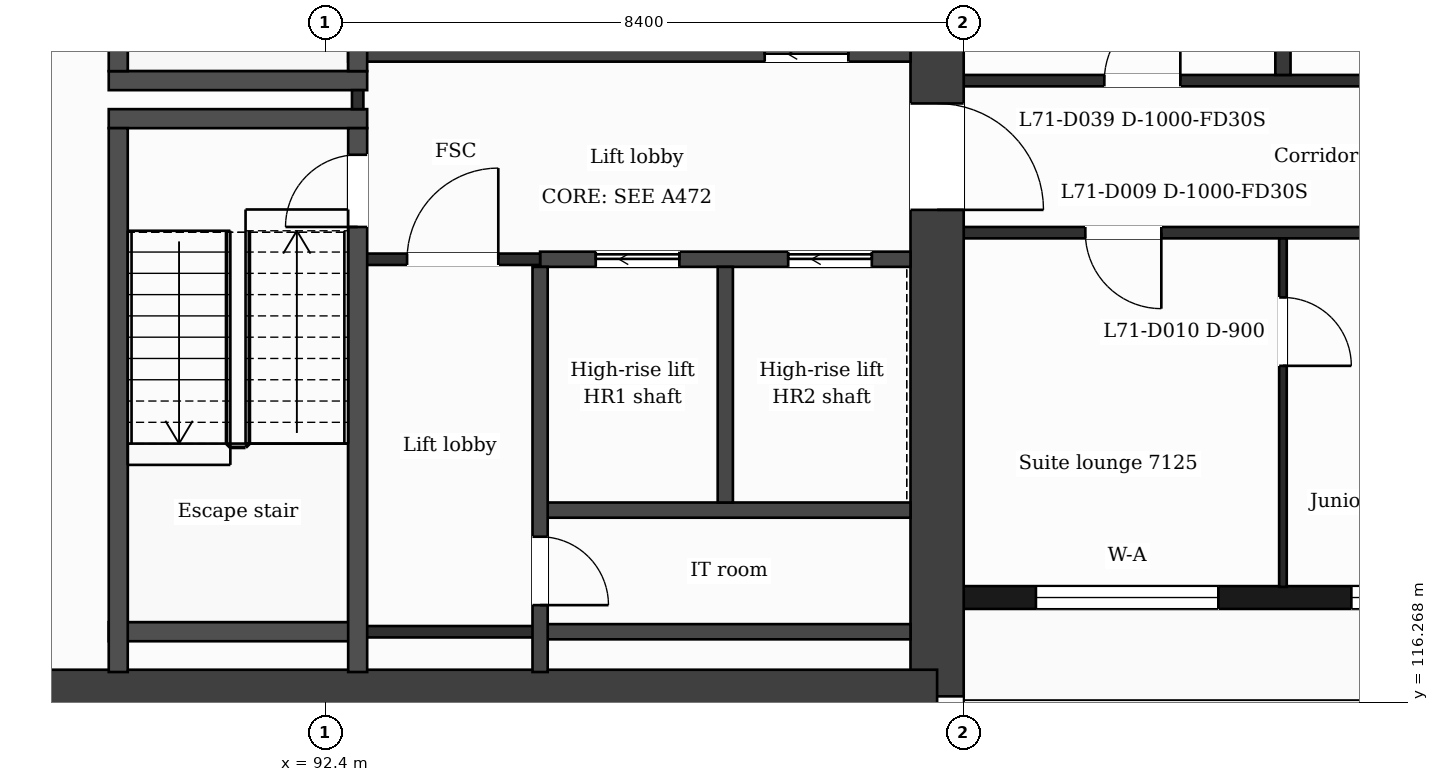
"""IFC4 building model, lengths in metres.
Left out: names, types, materials, properties, quantities, classifications, styles, units other than length and angle.
Written with IfcOpenShell. Run it as: python <this file> out.ifc"""

import sys

from ifc_helpers import new_model, si_unit, direction, frame, frame_2d, origin, place, context, subcontext, project, spatial, rectangle, extrude, element, fill, save


model = new_model("IFC4")
c1 = context("Model", 3, precision=1e-05, world=origin(), true_north=direction((0.0, 1.0)))
c2 = subcontext(c1, "Body", "Model", "MODEL_VIEW")
j1 = project(units=[si_unit("LENGTHUNIT", "METRE"), si_unit("PLANEANGLEUNIT", "RADIAN")], contexts=[c1])
p1 = place(None, origin())
s1 = spatial("IfcSite", under=j1, at=p1, CompositionType="ELEMENT")
p2 = place(p1, origin())
s2 = spatial("IfcBuilding", under=s1, at=p2, CompositionType="ELEMENT")
p3 = place(p2, frame((0.0, 0.0, 292.3)))
s3 = spatial("IfcBuildingStorey", under=s2, at=p3, CompositionType="ELEMENT", Elevation=292.3)
p4 = place(p3, frame((100.45, 132.05, 0.0), z_axis=(0.0, 0.0, 1.0), x_axis=(0.0, -1.0, 0.0)))
e1 = element("IfcWall", 1, at=p4, inside=s3, PredefinedType="SHEAR", context=c2, shape_type="SweptSolid", body=[
    extrude(rectangle(XDim=15.7, YDim=0.7, at=frame_2d((7.85, 0.0))), origin(), (0.0, 0.0, 1.0), 3.7),
])
p5 = place(p4, frame((7.9, 0.0, 0.0)))
e2 = element("IfcOpeningElement", 2, at=p5, cuts=e1, PredefinedType="OPENING", context=c2, shape_type="SweptSolid", body=[
    extrude(rectangle(XDim=1.4, YDim=2.1, at=frame_2d((0.7, 1.05))), frame((0.0, 0.36, 0.0), z_axis=(0.0, -1.0, 0.0), x_axis=(1.0, 0.0, 0.0)), (0.0, 0.0, 1.0), 0.72),
])
p6 = place(p3, frame((100.45, 116.35, 0.0), z_axis=(0.0, 0.0, 1.0), x_axis=(-1.0, 0.0, 0.0)))
e3 = element("IfcWall", 3, at=p6, inside=s3, PredefinedType="SHEAR", context=c2, shape_type="SweptSolid", body=[
    extrude(rectangle(XDim=13.627, YDim=0.7, at=frame_2d((6.813, 0.0))), origin(), (0.0, 0.0, 1.0), 3.7),
])
p7 = place(p3, frame((86.823, 116.35, 0.0), z_axis=(0.0, 0.0, 1.0), x_axis=(0.133416378607, 0.99106007382, 0.0)))
e4 = element("IfcWall", 4, at=p7, inside=s3, PredefinedType="SHEAR", context=c2, shape_type="SweptSolid", body=[
    extrude(rectangle(XDim=15.842, YDim=0.7, at=frame_2d((7.921, 0.0))), origin(), (0.0, 0.0, 1.0), 3.7),
])
p8 = place(p3, frame((100.8, 117.65, 0.0), z_axis=(0.0, 0.0, 1.0), x_axis=(1.0, 0.0, 0.0)))
e5 = element("IfcWall", 5, at=p8, inside=s3, PredefinedType="SOLIDWALL", context=c2, shape_type="SweptSolid", body=[
    extrude(rectangle(XDim=25.2, YDim=0.3, at=frame_2d((12.6, 0.0))), origin(), (0.0, 0.0, 1.0), 3.38),
])
p9 = place(p8, frame((0.95, 0.0, 0.9)))
e6 = element("IfcOpeningElement", 6, at=p9, cuts=e5, PredefinedType="OPENING", context=c2, shape_type="SweptSolid", body=[
    extrude(rectangle(XDim=2.4, YDim=2.1, at=frame_2d((1.2, 1.05))), frame((0.0, 0.16, 0.0), z_axis=(0.0, -1.0, 0.0), x_axis=(1.0, 0.0, 0.0)), (0.0, 0.0, 1.0), 0.32),
])
p10 = place(p8, frame((5.1, 0.0, 0.9)))
e7 = element("IfcOpeningElement", 7, at=p10, cuts=e5, PredefinedType="OPENING", context=c2, shape_type="SweptSolid", body=[
    extrude(rectangle(XDim=2.4, YDim=2.1, at=frame_2d((1.2, 1.05))), frame((0.0, 0.16, 0.0), z_axis=(0.0, -1.0, 0.0), x_axis=(1.0, 0.0, 0.0)), (0.0, 0.0, 1.0), 0.32),
])
p11 = place(p8, frame((9.9, 0.0, 0.0)))
e8 = element("IfcOpeningElement", 8, at=p11, cuts=e5, PredefinedType="OPENING", context=c2, shape_type="SweptSolid", body=[
    extrude(rectangle(XDim=1.2, YDim=2.4, at=frame_2d((0.6, 1.2))), frame((0.0, 0.16, 0.0), z_axis=(0.0, -1.0, 0.0), x_axis=(1.0, 0.0, 0.0)), (0.0, 0.0, 1.0), 0.32),
])
p12 = place(p8, frame((14.1, 0.0, 0.9)))
e9 = element("IfcOpeningElement", 9, at=p12, cuts=e5, PredefinedType="OPENING", context=c2, shape_type="SweptSolid", body=[
    extrude(rectangle(XDim=1.2, YDim=2.1, at=frame_2d((0.6, 1.05))), frame((0.0, 0.16, 0.0), z_axis=(0.0, -1.0, 0.0), x_axis=(1.0, 0.0, 0.0)), (0.0, 0.0, 1.0), 0.32),
])
p13 = place(p8, frame((17.7, 0.0, 0.9)))
e10 = element("IfcOpeningElement", 10, at=p13, cuts=e5, PredefinedType="OPENING", context=c2, shape_type="SweptSolid", body=[
    extrude(rectangle(XDim=2.4, YDim=2.1, at=frame_2d((1.2, 1.05))), frame((0.0, 0.16, 0.0), z_axis=(0.0, -1.0, 0.0), x_axis=(1.0, 0.0, 0.0)), (0.0, 0.0, 1.0), 0.32),
])
p14 = place(p8, frame((21.85, 0.0, 0.9)))
e11 = element("IfcOpeningElement", 11, at=p14, cuts=e5, PredefinedType="OPENING", context=c2, shape_type="SweptSolid", body=[
    extrude(rectangle(XDim=2.4, YDim=2.1, at=frame_2d((1.2, 1.05))), frame((0.0, 0.16, 0.0), z_axis=(0.0, -1.0, 0.0), x_axis=(1.0, 0.0, 0.0)), (0.0, 0.0, 1.0), 0.32),
])
p15 = place(p3, frame((95.227, 117.2, 0.0), z_axis=(0.0, 0.0, 1.0), x_axis=(1.0, 0.0, 0.0)))
e12 = element("IfcWall", 12, at=p15, inside=s3, PredefinedType="PARTITIONING", context=c2, shape_type="SweptSolid", body=[
    extrude(rectangle(XDim=4.873, YDim=0.2, at=frame_2d((2.437, 0.0))), origin(), (0.0, 0.0, 1.0), 3.38),
])
p16 = place(p3, frame((92.827, 117.2, 0.0), z_axis=(0.0, 0.0, 1.0), x_axis=(1.0, 0.0, 0.0)))
e13 = element("IfcWall", 13, at=p16, inside=s3, PredefinedType="PARTITIONING", context=c2, shape_type="SweptSolid", body=[
    extrude(rectangle(XDim=2.4, YDim=0.15, at=frame_2d((1.2, 0.0))), origin(), (0.0, 0.0, 1.0), 3.38),
])
p17 = place(p3, frame((89.552, 117.2, 0.0), z_axis=(0.0, 0.0, 1.0), x_axis=(1.0, 0.0, 0.0)))
e14 = element("IfcWall", 14, at=p17, inside=s3, PredefinedType="PARTITIONING", context=c2, shape_type="SweptSolid", body=[
    extrude(rectangle(XDim=3.275, YDim=0.25, at=frame_2d((1.637, 0.0))), origin(), (0.0, 0.0, 1.0), 3.38),
])
p18 = place(p3, frame((95.227, 118.8, 0.0), z_axis=(0.0, 0.0, 1.0), x_axis=(1.0, 0.0, 0.0)))
e15 = element("IfcWall", 15, at=p18, inside=s3, PredefinedType="PARTITIONING", context=c2, shape_type="SweptSolid", body=[
    extrude(rectangle(XDim=4.873, YDim=0.2, at=frame_2d((2.437, 0.0))), origin(), (0.0, 0.0, 1.0), 3.38),
])
p19 = place(p3, frame((95.227, 122.1, 0.0), z_axis=(0.0, 0.0, 1.0), x_axis=(1.0, 0.0, 0.0)))
e16 = element("IfcWall", 16, at=p19, inside=s3, PredefinedType="PARTITIONING", context=c2, shape_type="SweptSolid", body=[
    extrude(rectangle(XDim=4.873, YDim=0.2, at=frame_2d((2.437, 0.0))), origin(), (0.0, 0.0, 1.0), 3.38),
])
p20 = place(p19, frame((0.732, 0.0, 0.0)))
e17 = element("IfcOpeningElement", 17, at=p20, cuts=e16, PredefinedType="OPENING", context=c2, shape_type="SweptSolid", body=[
    extrude(rectangle(XDim=1.1, YDim=2.1, at=frame_2d((0.55, 1.05))), frame((0.0, 0.11, 0.0), z_axis=(0.0, -1.0, 0.0), x_axis=(1.0, 0.0, 0.0)), (0.0, 0.0, 1.0), 0.22),
])
p21 = place(p19, frame((3.264, 0.0, 0.0)))
e18 = element("IfcOpeningElement", 18, at=p21, cuts=e16, PredefinedType="OPENING", context=c2, shape_type="SweptSolid", body=[
    extrude(rectangle(XDim=1.1, YDim=2.1, at=frame_2d((0.55, 1.05))), frame((0.0, 0.11, 0.0), z_axis=(0.0, -1.0, 0.0), x_axis=(1.0, 0.0, 0.0)), (0.0, 0.0, 1.0), 0.22),
])
p22 = place(p3, frame((92.827, 122.1, 0.0), z_axis=(0.0, 0.0, 1.0), x_axis=(1.0, 0.0, 0.0)))
e19 = element("IfcWall", 19, at=p22, inside=s3, PredefinedType="PARTITIONING", context=c2, shape_type="SweptSolid", body=[
    extrude(rectangle(XDim=2.4, YDim=0.15, at=frame_2d((1.2, 0.0))), origin(), (0.0, 0.0, 1.0), 3.38),
])
p23 = place(p22, frame((0.65, 0.0, 0.0)))
e20 = element("IfcOpeningElement", 20, at=p23, cuts=e19, PredefinedType="OPENING", context=c2, shape_type="SweptSolid", body=[
    extrude(rectangle(XDim=1.2, YDim=2.1, at=frame_2d((0.6, 1.05))), frame((0.0, 0.085, 0.0), z_axis=(0.0, -1.0, 0.0), x_axis=(1.0, 0.0, 0.0)), (0.0, 0.0, 1.0), 0.17),
])
p24 = place(p3, frame((100.8, 122.45, 0.0), z_axis=(0.0, 0.0, 1.0), x_axis=(1.0, 0.0, 0.0)))
e21 = element("IfcWall", 21, at=p24, inside=s3, PredefinedType="PARTITIONING", context=c2, shape_type="SweptSolid", body=[
    extrude(rectangle(XDim=25.2, YDim=0.15, at=frame_2d((12.6, 0.0))), origin(), (0.0, 0.0, 1.0), 3.38),
])
p25 = place(p24, frame((1.6, 0.0, 0.0)))
e22 = element("IfcOpeningElement", 22, at=p25, cuts=e21, PredefinedType="OPENING", context=c2, shape_type="SweptSolid", body=[
    extrude(rectangle(XDim=1.0, YDim=2.1, at=frame_2d((0.5, 1.05))), frame((0.0, 0.085, 0.0), z_axis=(0.0, -1.0, 0.0), x_axis=(1.0, 0.0, 0.0)), (0.0, 0.0, 1.0), 0.17),
])
p26 = place(p24, frame((11.12, 0.0, 0.0)))
e23 = element("IfcOpeningElement", 23, at=p26, cuts=e21, PredefinedType="OPENING", context=c2, shape_type="SweptSolid", body=[
    extrude(rectangle(XDim=0.95, YDim=2.1, at=frame_2d((0.475, 1.05))), frame((0.0, 0.085, 0.0), z_axis=(0.0, -1.0, 0.0), x_axis=(1.0, 0.0, 0.0)), (0.0, 0.0, 1.0), 0.17),
])
p27 = place(p24, frame((13.05, 0.0, 0.0)))
e24 = element("IfcOpeningElement", 24, at=p27, cuts=e21, PredefinedType="OPENING", context=c2, shape_type="SweptSolid", body=[
    extrude(rectangle(XDim=1.0, YDim=2.1, at=frame_2d((0.5, 1.05))), frame((0.0, 0.085, 0.0), z_axis=(0.0, -1.0, 0.0), x_axis=(1.0, 0.0, 0.0)), (0.0, 0.0, 1.0), 0.17),
])
p28 = place(p24, frame((19.61, 0.0, 0.0)))
e25 = element("IfcOpeningElement", 25, at=p28, cuts=e21, PredefinedType="OPENING", context=c2, shape_type="SweptSolid", body=[
    extrude(rectangle(XDim=0.95, YDim=2.1, at=frame_2d((0.475, 1.05))), frame((0.0, 0.085, 0.0), z_axis=(0.0, -1.0, 0.0), x_axis=(1.0, 0.0, 0.0)), (0.0, 0.0, 1.0), 0.17),
])
p29 = place(p24, frame((21.275, 0.0, 0.0)))
e26 = element("IfcOpeningElement", 26, at=p29, cuts=e21, PredefinedType="OPENING", context=c2, shape_type="SweptSolid", body=[
    extrude(rectangle(XDim=0.95, YDim=2.1, at=frame_2d((0.475, 1.05))), frame((0.0, 0.085, 0.0), z_axis=(0.0, -1.0, 0.0), x_axis=(1.0, 0.0, 0.0)), (0.0, 0.0, 1.0), 0.17),
])
for number, where, z_axis, x_axis in (
    (27, (89.552, 123.95, 0.0), (0.0, 0.0, 1.0), (1.0, 0.0, 0.0)),
    (28, (89.552, 124.45, 0.0), (0.0, 0.0, 1.0), (1.0, 0.0, 0.0)),
):
    element("IfcWall", number, at=place(p3, frame(where, z_axis=z_axis, x_axis=x_axis)), inside=s3, PredefinedType="PARTITIONING", context=c2, shape_type="SweptSolid", body=[
        extrude(rectangle(XDim=3.4, YDim=0.25, at=frame_2d((1.7, 0.0))), origin(), (0.0, 0.0, 1.0), 3.38),
    ])
p30 = place(p3, frame((100.8, 124.45, 0.0), z_axis=(0.0, 0.0, 1.0), x_axis=(1.0, 0.0, 0.0)))
e29 = element("IfcWall", 29, at=p30, inside=s3, PredefinedType="PARTITIONING", context=c2, shape_type="SweptSolid", body=[
    extrude(rectangle(XDim=25.2, YDim=0.15, at=frame_2d((12.6, 0.0))), origin(), (0.0, 0.0, 1.0), 3.38),
])
p31 = place(p30, frame((1.85, 0.0, 0.0)))
e30 = element("IfcOpeningElement", 30, at=p31, cuts=e29, PredefinedType="OPENING", context=c2, shape_type="SweptSolid", body=[
    extrude(rectangle(XDim=1.0, YDim=2.1, at=frame_2d((0.5, 1.05))), frame((0.0, 0.085, 0.0), z_axis=(0.0, -1.0, 0.0), x_axis=(1.0, 0.0, 0.0)), (0.0, 0.0, 1.0), 0.17),
])
p32 = place(p30, frame((6.425, 0.0, 0.0)))
e31 = element("IfcOpeningElement", 31, at=p32, cuts=e29, PredefinedType="OPENING", context=c2, shape_type="SweptSolid", body=[
    extrude(rectangle(XDim=1.0, YDim=2.1, at=frame_2d((0.5, 1.05))), frame((0.0, 0.085, 0.0), z_axis=(0.0, -1.0, 0.0), x_axis=(1.0, 0.0, 0.0)), (0.0, 0.0, 1.0), 0.17),
])
p33 = place(p30, frame((9.4, 0.0, 0.0)))
e32 = element("IfcOpeningElement", 32, at=p33, cuts=e29, PredefinedType="OPENING", context=c2, shape_type="SweptSolid", body=[
    extrude(rectangle(XDim=1.0, YDim=2.1, at=frame_2d((0.5, 1.05))), frame((0.0, 0.085, 0.0), z_axis=(0.0, -1.0, 0.0), x_axis=(1.0, 0.0, 0.0)), (0.0, 0.0, 1.0), 0.17),
])
p34 = place(p30, frame((14.825, 0.0, 0.0)))
e33 = element("IfcOpeningElement", 33, at=p34, cuts=e29, PredefinedType="OPENING", context=c2, shape_type="SweptSolid", body=[
    extrude(rectangle(XDim=1.0, YDim=2.1, at=frame_2d((0.5, 1.05))), frame((0.0, 0.085, 0.0), z_axis=(0.0, -1.0, 0.0), x_axis=(1.0, 0.0, 0.0)), (0.0, 0.0, 1.0), 0.17),
])
p35 = place(p30, frame((18.825, 0.0, 0.0)))
e34 = element("IfcOpeningElement", 34, at=p35, cuts=e29, PredefinedType="OPENING", context=c2, shape_type="SweptSolid", body=[
    extrude(rectangle(XDim=1.0, YDim=2.1, at=frame_2d((0.5, 1.05))), frame((0.0, 0.085, 0.0), z_axis=(0.0, -1.0, 0.0), x_axis=(1.0, 0.0, 0.0)), (0.0, 0.0, 1.0), 0.17),
])
p36 = place(p3, frame((92.702, 124.8, 0.0), z_axis=(0.0, 0.0, 1.0), x_axis=(1.0, 0.0, 0.0)))
e35 = element("IfcWall", 35, at=p36, inside=s3, PredefinedType="PARTITIONING", context=c2, shape_type="SweptSolid", body=[
    extrude(rectangle(XDim=7.398, YDim=0.2, at=frame_2d((3.699, 0.0))), origin(), (0.0, 0.0, 1.0), 3.38),
])
p37 = place(p36, frame((5.48, 0.0, 0.0)))
e36 = element("IfcOpeningElement", 36, at=p37, cuts=e35, PredefinedType="OPENING", context=c2, shape_type="SweptSolid", body=[
    extrude(rectangle(XDim=1.1, YDim=2.1, at=frame_2d((0.55, 1.05))), frame((0.0, 0.11, 0.0), z_axis=(0.0, -1.0, 0.0), x_axis=(1.0, 0.0, 0.0)), (0.0, 0.0, 1.0), 0.22),
])
for number, where, z_axis, x_axis in (
    (37, (89.677, 116.67, 0.0), (0.0, 0.0, 1.0), (0.0, 1.0, 0.0)),
    (38, (89.677, 124.575, 0.0), (0.0, 0.0, 1.0), (0.0, 1.0, 0.0)),
):
    element("IfcWall", number, at=place(p3, frame(where, z_axis=z_axis, x_axis=x_axis)), inside=s3, PredefinedType="PARTITIONING", context=c2, shape_type="SweptSolid", body=[
        extrude(rectangle(XDim=7.155, YDim=0.25, at=frame_2d((3.578, 0.0))), origin(), (0.0, 0.0, 1.0), 3.38),
    ])
p38 = place(p3, frame((92.827, 124.075, 0.0), z_axis=(0.0, 0.0, 1.0), x_axis=(0.0, 1.0, 0.0)))
e39 = element("IfcWall", 39, at=p38, inside=s3, PredefinedType="PARTITIONING", context=c2, shape_type="SweptSolid", body=[
    extrude(rectangle(XDim=0.25, YDim=0.15, at=frame_2d((0.125, 0.0))), origin(), (0.0, 0.0, 1.0), 3.38),
])
p39 = place(p3, frame((92.827, 116.67, 0.0), z_axis=(0.0, 0.0, 1.0), x_axis=(0.0, 1.0, 0.0)))
e40 = element("IfcWall", 40, at=p39, inside=s3, PredefinedType="PARTITIONING", context=c2, shape_type="SweptSolid", body=[
    extrude(rectangle(XDim=7.155, YDim=0.25, at=frame_2d((3.578, 0.0))), origin(), (0.0, 0.0, 1.0), 3.38),
])
p40 = place(p39, frame((5.855, 0.0, 0.0)))
e41 = element("IfcOpeningElement", 41, at=p40, cuts=e40, PredefinedType="OPENING", context=c2, shape_type="SweptSolid", body=[
    extrude(rectangle(XDim=0.95, YDim=2.1, at=frame_2d((0.475, 1.05))), frame((0.0, 0.135, 0.0), z_axis=(0.0, -1.0, 0.0), x_axis=(1.0, 0.0, 0.0)), (0.0, 0.0, 1.0), 0.27),
])
p41 = place(p3, frame((92.827, 124.575, 0.0), z_axis=(0.0, 0.0, 1.0), x_axis=(0.0, 1.0, 0.0)))
e42 = element("IfcWall", 42, at=p41, inside=s3, PredefinedType="PARTITIONING", context=c2, shape_type="SweptSolid", body=[
    extrude(rectangle(XDim=7.155, YDim=0.25, at=frame_2d((3.578, 0.0))), origin(), (0.0, 0.0, 1.0), 3.38),
])
p42 = place(p41, frame((5.325, 0.0, 0.0)))
e43 = element("IfcOpeningElement", 43, at=p42, cuts=e42, PredefinedType="OPENING", context=c2, shape_type="SweptSolid", body=[
    extrude(rectangle(XDim=1.0, YDim=2.1, at=frame_2d((0.5, 1.05))), frame((0.0, 0.135, 0.0), z_axis=(0.0, -1.0, 0.0), x_axis=(1.0, 0.0, 0.0)), (0.0, 0.0, 1.0), 0.27),
])
p43 = place(p3, frame((95.227, 116.67, 0.0), z_axis=(0.0, 0.0, 1.0), x_axis=(0.0, 1.0, 0.0)))
e44 = element("IfcWall", 44, at=p43, inside=s3, PredefinedType="PARTITIONING", context=c2, shape_type="SweptSolid", body=[
    extrude(rectangle(XDim=5.33, YDim=0.2, at=frame_2d((2.665, 0.0))), origin(), (0.0, 0.0, 1.0), 3.38),
])
p44 = place(p43, frame((0.88, 0.0, 0.0)))
e45 = element("IfcOpeningElement", 45, at=p44, cuts=e44, PredefinedType="OPENING", context=c2, shape_type="SweptSolid", body=[
    extrude(rectangle(XDim=0.9, YDim=2.1, at=frame_2d((0.45, 1.05))), frame((0.0, 0.11, 0.0), z_axis=(0.0, -1.0, 0.0), x_axis=(1.0, 0.0, 0.0)), (0.0, 0.0, 1.0), 0.22),
])
p45 = place(p3, frame((97.664, 118.9, 0.0), z_axis=(0.0, 0.0, 1.0), x_axis=(0.0, 1.0, 0.0)))
e46 = element("IfcWall", 46, at=p45, inside=s3, PredefinedType="PARTITIONING", context=c2, shape_type="SweptSolid", body=[
    extrude(rectangle(XDim=3.1, YDim=0.2, at=frame_2d((1.55, 0.0))), origin(), (0.0, 0.0, 1.0), 3.38),
])
p46 = place(p3, frame((105.0, 117.79, 0.0), z_axis=(0.0, 0.0, 1.0), x_axis=(0.0, 1.0, 0.0)))
e47 = element("IfcWall", 47, at=p46, inside=s3, PredefinedType="PARTITIONING", context=c2, shape_type="SweptSolid", body=[
    extrude(rectangle(XDim=4.585, YDim=0.1, at=frame_2d((2.292, 0.0))), origin(), (0.0, 0.0, 1.0), 3.38),
])
p47 = place(p46, frame((2.908, 0.0, 0.0)))
e48 = element("IfcOpeningElement", 48, at=p47, cuts=e47, PredefinedType="OPENING", context=c2, shape_type="SweptSolid", body=[
    extrude(rectangle(XDim=0.9, YDim=2.1, at=frame_2d((0.45, 1.05))), frame((0.0, 0.06, 0.0), z_axis=(0.0, -1.0, 0.0), x_axis=(1.0, 0.0, 0.0)), (0.0, 0.0, 1.0), 0.12),
])
p48 = place(p3, frame((105.0, 124.525, 0.0), z_axis=(0.0, 0.0, 1.0), x_axis=(0.0, 1.0, 0.0)))
e49 = element("IfcWall", 49, at=p48, inside=s3, PredefinedType="PARTITIONING", context=c2, shape_type="SweptSolid", body=[
    extrude(rectangle(XDim=9.2, YDim=0.2, at=frame_2d((4.6, 0.0))), origin(), (0.0, 0.0, 1.0), 3.38),
])
p49 = place(p9, origin())
e50 = element("IfcWindow", 50, at=p49, inside=s3, PartitioningType="SINGLE_PANEL", PredefinedType="WINDOW", context=c2, shape_type="SweptSolid", body=[
    extrude(rectangle(XDim=2.4, YDim=2.1, at=frame_2d((1.2, 1.05))), frame((0.0, 0.03, 0.0), z_axis=(0.0, -1.0, 0.0), x_axis=(1.0, 0.0, 0.0)), (0.0, 0.0, 1.0), 0.06),
])
fill(e6, e50)
p50 = place(p10, origin())
e51 = element("IfcWindow", 51, at=p50, inside=s3, PartitioningType="SINGLE_PANEL", PredefinedType="WINDOW", context=c2, shape_type="SweptSolid", body=[
    extrude(rectangle(XDim=2.4, YDim=2.1, at=frame_2d((1.2, 1.05))), frame((0.0, 0.03, 0.0), z_axis=(0.0, -1.0, 0.0), x_axis=(1.0, 0.0, 0.0)), (0.0, 0.0, 1.0), 0.06),
])
fill(e7, e51)
p51 = place(p23, origin())
e52 = element("IfcDoor", 52, at=p51, inside=s3, OperationType="SINGLE_SWING_RIGHT", PredefinedType="DOOR", context=c2, shape_type="SweptSolid", body=[
    extrude(rectangle(XDim=1.2, YDim=2.1, at=frame_2d((0.6, 1.05))), frame((0.0, 0.025, 0.0), z_axis=(0.0, -1.0, 0.0), x_axis=(1.0, 0.0, 0.0)), (0.0, 0.0, 1.0), 0.05),
])
fill(e20, e52)
p52 = place(p20, origin())
e53 = element("IfcDoor", 53, at=p52, inside=s3, OperationType="SLIDING_TO_LEFT", PredefinedType="DOOR", context=c2, shape_type="SweptSolid", body=[
    extrude(rectangle(XDim=1.1, YDim=2.1, at=frame_2d((0.55, 1.05))), frame((0.0, 0.025, 0.0), z_axis=(0.0, -1.0, 0.0), x_axis=(1.0, 0.0, 0.0)), (0.0, 0.0, 1.0), 0.05),
])
fill(e17, e53)
p53 = place(p21, origin())
e54 = element("IfcDoor", 54, at=p53, inside=s3, OperationType="SLIDING_TO_LEFT", PredefinedType="DOOR", context=c2, shape_type="SweptSolid", body=[
    extrude(rectangle(XDim=1.1, YDim=2.1, at=frame_2d((0.55, 1.05))), frame((0.0, 0.025, 0.0), z_axis=(0.0, -1.0, 0.0), x_axis=(1.0, 0.0, 0.0)), (0.0, 0.0, 1.0), 0.05),
])
fill(e18, e54)
p54 = place(p37, origin())
e55 = element("IfcDoor", 55, at=p54, inside=s3, OperationType="SLIDING_TO_LEFT", PredefinedType="DOOR", context=c2, shape_type="SweptSolid", body=[
    extrude(rectangle(XDim=1.1, YDim=2.1, at=frame_2d((0.55, 1.05))), frame((0.0, 0.025, 0.0), z_axis=(0.0, -1.0, 0.0), x_axis=(1.0, 0.0, 0.0)), (0.0, 0.0, 1.0), 0.05),
])
fill(e36, e55)
p55 = place(p40, origin())
e56 = element("IfcDoor", 56, at=p55, inside=s3, OperationType="SINGLE_SWING_LEFT", PredefinedType="DOOR", context=c2, shape_type="SweptSolid", body=[
    extrude(rectangle(XDim=0.95, YDim=2.1, at=frame_2d((0.475, 1.05))), frame((0.0, 0.025, 0.0), z_axis=(0.0, -1.0, 0.0), x_axis=(1.0, 0.0, 0.0)), (0.0, 0.0, 1.0), 0.05),
])
fill(e41, e56)
p56 = place(p44, origin())
e57 = element("IfcDoor", 57, at=p56, inside=s3, OperationType="SINGLE_SWING_LEFT", PredefinedType="DOOR", context=c2, shape_type="SweptSolid", body=[
    extrude(rectangle(XDim=0.9, YDim=2.1, at=frame_2d((0.45, 1.05))), frame((0.0, 0.025, 0.0), z_axis=(0.0, -1.0, 0.0), x_axis=(1.0, 0.0, 0.0)), (0.0, 0.0, 1.0), 0.05),
])
fill(e45, e57)
p57 = place(p25, origin())
e58 = element("IfcDoor", 58, at=p57, inside=s3, OperationType="SINGLE_SWING_RIGHT", PredefinedType="DOOR", context=c2, shape_type="SweptSolid", body=[
    extrude(rectangle(XDim=1.0, YDim=2.1, at=frame_2d((0.5, 1.05))), frame((0.0, 0.025, 0.0), z_axis=(0.0, -1.0, 0.0), x_axis=(1.0, 0.0, 0.0)), (0.0, 0.0, 1.0), 0.05),
])
fill(e22, e58)
p58 = place(p47, origin())
e59 = element("IfcDoor", 59, at=p58, inside=s3, OperationType="SINGLE_SWING_LEFT", PredefinedType="DOOR", context=c2, shape_type="SweptSolid", body=[
    extrude(rectangle(XDim=0.9, YDim=2.1, at=frame_2d((0.45, 1.05))), frame((0.0, 0.025, 0.0), z_axis=(0.0, -1.0, 0.0), x_axis=(1.0, 0.0, 0.0)), (0.0, 0.0, 1.0), 0.05),
])
fill(e48, e59)
p59 = place(p31, origin())
e60 = element("IfcDoor", 60, at=p59, inside=s3, OperationType="SINGLE_SWING_RIGHT", PredefinedType="DOOR", context=c2, shape_type="SweptSolid", body=[
    extrude(rectangle(XDim=1.0, YDim=2.1, at=frame_2d((0.5, 1.05))), frame((0.0, 0.025, 0.0), z_axis=(0.0, -1.0, 0.0), x_axis=(1.0, 0.0, 0.0)), (0.0, 0.0, 1.0), 0.05),
])
fill(e30, e60)
p60 = place(p5, origin())
e61 = element("IfcDoor", 61, at=p60, inside=s3, OperationType="SINGLE_SWING_RIGHT", PredefinedType="DOOR", context=c2, shape_type="SweptSolid", body=[
    extrude(rectangle(XDim=1.4, YDim=2.1, at=frame_2d((0.7, 1.05))), frame((0.0, 0.025, 0.0), z_axis=(0.0, -1.0, 0.0), x_axis=(1.0, 0.0, 0.0)), (0.0, 0.0, 1.0), 0.05),
])
fill(e2, e61)
save(model, sys.argv[1])
